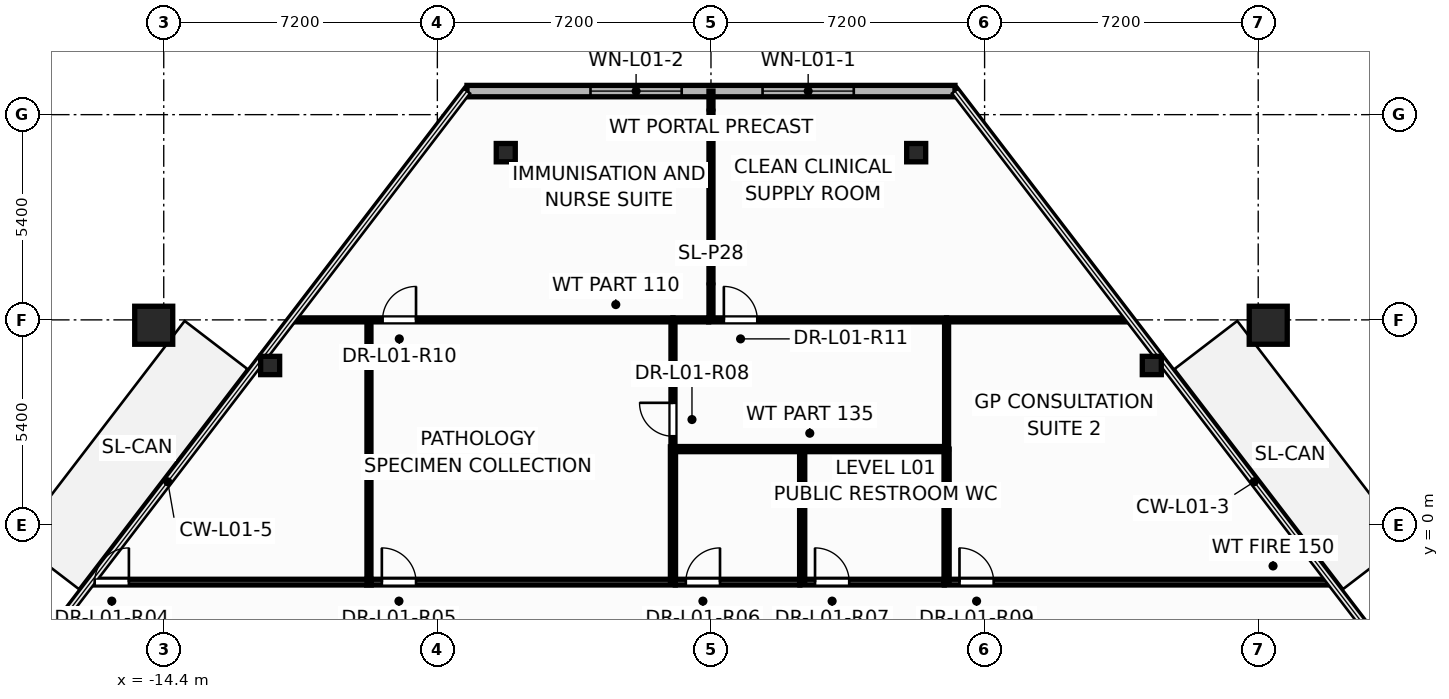
"""IFC4 building model, lengths in metres.
Left out: names, types, materials, properties, quantities, classifications, styles, units other than length and angle.
Written with IfcOpenShell. Run it as: python <this file> out.ifc"""

import sys

from ifc_helpers import new_model, si_unit, direction, frame, frame_2d, origin, origin_2d, place, context, subcontext, project, spatial, rectangle, hollow_circle, i_section, extrude, element, fill, save


model = new_model("IFC4")
c1 = context("Model", 3, precision=1e-05, world=origin(), true_north=direction((0.0, 1.0)))
c2 = subcontext(c1, "Body", "Model", "MODEL_VIEW")
j1 = project(units=[si_unit("LENGTHUNIT", "METRE"), si_unit("PLANEANGLEUNIT", "RADIAN")], contexts=[c1])
p1 = place(None, origin())
s1 = spatial("IfcSite", under=j1, at=p1, CompositionType="ELEMENT")
p2 = place(p1, origin())
s2 = spatial("IfcBuilding", under=s1, at=p2, CompositionType="ELEMENT")
p3 = place(p2, frame((0.0, 0.0, 5.4)))
s3 = spatial("IfcBuildingStorey", under=s2, at=p3, CompositionType="ELEMENT", Elevation=5.4)
for number, where, z_axis, x_axis in (
    (1, (14.664, 5.259, 0.0), (0.0, 0.0, 1.0), (1.0, 0.0, 0.0)),
    (2, (-14.664, 5.259, 0.0), (0.0, 0.0, 1.0), (1.0, 0.0, 0.0)),
):
    element("IfcColumn", number, at=place(p3, frame(where, z_axis=z_axis, x_axis=x_axis)), inside=s3, PredefinedType="COLUMN", context=c2, shape_type="SweptSolid", body=[
        extrude(hollow_circle(Radius=0.5, WallThickness=0.045, at=origin_2d()), origin(), (0.0, 0.0, 1.0), 4.5),
    ])
for number, where, z_axis, x_axis in (
    (3, (-11.6, 4.2, 0.0), (0.0, 0.0, 1.0), (1.0, 0.0, 0.0)),
    (4, (11.6, 4.2, 0.0), (0.0, 0.0, 1.0), (1.0, 0.0, 0.0)),
    (5, (-5.4, 9.8, 0.0), (0.0, 0.0, 1.0), (1.0, 0.0, 0.0)),
    (6, (5.4, 9.8, 0.0), (0.0, 0.0, 1.0), (1.0, 0.0, 0.0)),
):
    element("IfcColumn", number, at=place(p3, frame(where, z_axis=z_axis, x_axis=x_axis)), inside=s3, PredefinedType="COLUMN", context=c2, shape_type="SweptSolid", body=[
        extrude(i_section(OverallWidth=0.5, OverallDepth=0.482, WebThickness=0.04, FlangeThickness=0.045, at=origin_2d()), origin(), (0.0, 0.0, 1.0), 4.5),
    ])
p4 = place(p3, frame((6.421, 11.42, -0.015), z_axis=(0.0, 0.0, 1.0), x_axis=(-1.0, 0.0, 0.0)))
e7 = element("IfcWall", 7, at=p4, inside=s3, PredefinedType="SOLIDWALL", context=c2, shape_type="SweptSolid", body=[
    extrude(rectangle(XDim=12.842, YDim=0.3, at=frame_2d((6.421, 0.0))), origin(), (0.0, 0.0, 1.0), 4.235),
])
p5 = place(p4, frame((2.663, 0.0, 0.9)))
e8 = element("IfcOpeningElement", 8, at=p5, cuts=e7, PredefinedType="OPENING", context=c2, shape_type="SweptSolid", body=[
    extrude(rectangle(XDim=2.406, YDim=1.804, at=frame_2d((1.2, 0.902))), frame((0.0, 0.16, 0.0), z_axis=(0.0, -1.0, 0.0), x_axis=(1.0, 0.0, 0.0)), (0.0, 0.0, 1.0), 0.32),
])
p6 = place(p4, frame((7.191, 0.0, 0.9)))
e9 = element("IfcOpeningElement", 9, at=p6, cuts=e7, PredefinedType="OPENING", context=c2, shape_type="SweptSolid", body=[
    extrude(rectangle(XDim=2.406, YDim=1.804, at=frame_2d((1.2, 0.902))), frame((0.0, 0.16, 0.0), z_axis=(0.0, -1.0, 0.0), x_axis=(1.0, 0.0, 0.0)), (0.0, 0.0, 1.0), 0.32),
])
p7 = place(p3, frame((6.14, -1.5, 0.0), z_axis=(0.0, 0.0, 1.0), x_axis=(1.0, 0.0, 0.0)))
e10 = element("IfcWall", 10, at=p7, inside=s3, PredefinedType="PARTITIONING", context=c2, shape_type="SweptSolid", body=[
    extrude(rectangle(XDim=10.177, YDim=0.15, at=frame_2d((5.088, 0.0))), origin(), (0.0, 0.0, 1.0), 4.068),
])
p8 = place(p7, frame((0.399, 0.0, 0.0)))
e11 = element("IfcOpeningElement", 11, at=p8, cuts=e10, PredefinedType="OPENING", context=c2, shape_type="SweptSolid", body=[
    extrude(rectangle(XDim=0.906, YDim=2.104, at=frame_2d((0.45, 1.052))), frame((0.0, 0.085, 0.0), z_axis=(0.0, -1.0, 0.0), x_axis=(1.0, 0.0, 0.0)), (0.0, 0.0, 1.0), 0.17),
])
p9 = place(p3, frame((-11.032, 5.4, 0.0), z_axis=(0.0, 0.0, 1.0), x_axis=(1.0, 0.0, 0.0)))
e12 = element("IfcWall", 12, at=p9, inside=s3, PredefinedType="PARTITIONING", context=c2, shape_type="SweptSolid", body=[
    extrude(rectangle(XDim=10.032, YDim=0.105, at=frame_2d((5.016, 0.0))), origin(), (0.0, 0.0, 1.0), 3.195),
])
p10 = place(p9, frame((2.39, 0.0, 0.0)))
e13 = element("IfcOpeningElement", 13, at=p10, cuts=e12, PredefinedType="OPENING", context=c2, shape_type="SweptSolid", body=[
    extrude(rectangle(XDim=0.886, YDim=2.104, at=frame_2d((0.44, 1.052))), frame((0.0, 0.062, 0.0), z_axis=(0.0, -1.0, 0.0), x_axis=(1.0, 0.0, 0.0)), (0.0, 0.0, 1.0), 0.125),
])
p11 = place(p3, frame((-9.06, -1.5, 0.0), z_axis=(0.0, 0.0, 1.0), x_axis=(1.0, 0.0, 0.0)))
e14 = element("IfcWall", 14, at=p11, inside=s3, PredefinedType="PARTITIONING", context=c2, shape_type="SweptSolid", body=[
    extrude(rectangle(XDim=8.12, YDim=0.15, at=frame_2d((4.06, 0.0))), origin(), (0.0, 0.0, 1.0), 4.22),
])
p12 = place(p11, frame((0.399, 0.0, 0.0)))
e15 = element("IfcOpeningElement", 15, at=p12, cuts=e14, PredefinedType="OPENING", context=c2, shape_type="SweptSolid", body=[
    extrude(rectangle(XDim=0.906, YDim=2.104, at=frame_2d((0.45, 1.052))), frame((0.0, 0.085, 0.0), z_axis=(0.0, -1.0, 0.0), x_axis=(1.0, 0.0, 0.0)), (0.0, 0.0, 1.0), 0.17),
])
p13 = place(p3, frame((-16.317, -1.5, 0.0), z_axis=(0.0, 0.0, 1.0), x_axis=(1.0, 0.0, 0.0)))
e16 = element("IfcWall", 16, at=p13, inside=s3, PredefinedType="PARTITIONING", context=c2, shape_type="SweptSolid", body=[
    extrude(rectangle(XDim=7.377, YDim=0.15, at=frame_2d((3.688, 0.0))), origin(), (0.0, 0.0, 1.0), 4.068),
])
p14 = place(p13, frame((0.1, 0.0, 0.0)))
e17 = element("IfcOpeningElement", 17, at=p14, cuts=e16, PredefinedType="OPENING", context=c2, shape_type="SweptSolid", body=[
    extrude(rectangle(XDim=0.906, YDim=2.104, at=frame_2d((0.45, 1.052))), frame((0.0, 0.085, 0.0), z_axis=(0.0, -1.0, 0.0), x_axis=(1.0, 0.0, 0.0)), (0.0, 0.0, 1.0), 0.17),
])
p15 = place(p3, frame((-9.0, -1.5, 0.0), z_axis=(0.0, 0.0, 1.0), x_axis=(0.0, 1.0, 0.0)))
e18 = element("IfcWall", 18, at=p15, inside=s3, PredefinedType="PARTITIONING", context=c2, shape_type="SweptSolid", body=[
    extrude(rectangle(XDim=6.9, YDim=0.105, at=frame_2d((3.45, 0.0))), origin(), (0.0, 0.0, 1.0), 2.995),
])
p16 = place(p3, frame((-0.06, 5.4, 0.0), z_axis=(0.0, 0.0, 1.0), x_axis=(1.0, 0.0, 0.0)))
e19 = element("IfcWall", 19, at=p16, inside=s3, PredefinedType="PARTITIONING", context=c2, shape_type="SweptSolid", body=[
    extrude(rectangle(XDim=6.26, YDim=0.105, at=frame_2d((3.13, 0.0))), origin(), (0.0, 0.0, 1.0), 4.22),
])
p17 = place(p16, frame((0.399, 0.0, 0.0)))
e20 = element("IfcOpeningElement", 20, at=p17, cuts=e19, PredefinedType="OPENING", context=c2, shape_type="SweptSolid", body=[
    extrude(rectangle(XDim=0.886, YDim=2.104, at=frame_2d((0.44, 1.052))), frame((0.0, 0.062, 0.0), z_axis=(0.0, -1.0, 0.0), x_axis=(1.0, 0.0, 0.0)), (0.0, 0.0, 1.0), 0.125),
])
p18 = place(p3, frame((0.0, 5.4, 0.0), z_axis=(0.0, 0.0, 1.0), x_axis=(0.0, 1.0, 0.0)))
e21 = element("IfcWall", 21, at=p18, inside=s3, PredefinedType="PARTITIONING", context=c2, shape_type="SweptSolid", body=[
    extrude(rectangle(XDim=6.02, YDim=0.105, at=frame_2d((3.01, 0.0))), origin(), (0.0, 0.0, 1.0), 3.195),
])
p19 = place(p3, frame((6.2, 5.4, 0.0), z_axis=(0.0, 0.0, 1.0), x_axis=(1.0, 0.0, 0.0)))
e22 = element("IfcWall", 22, at=p19, inside=s3, PredefinedType="PARTITIONING", context=c2, shape_type="SweptSolid", body=[
    extrude(rectangle(XDim=4.832, YDim=0.105, at=frame_2d((2.416, 0.0))), origin(), (0.0, 0.0, 1.0), 3.195),
])
p20 = place(p3, frame((2.34, -1.5, 0.0), z_axis=(0.0, 0.0, 1.0), x_axis=(1.0, 0.0, 0.0)))
e23 = element("IfcWall", 23, at=p20, inside=s3, PredefinedType="PARTITIONING", context=c2, shape_type="SweptSolid", body=[
    extrude(rectangle(XDim=3.798, YDim=0.15, at=frame_2d((1.899, 0.0))), origin(), (0.0, 0.0, 1.0), 4.22),
])
p21 = place(p20, frame((0.398, 0.0, 0.0)))
e24 = element("IfcOpeningElement", 24, at=p21, cuts=e23, PredefinedType="OPENING", context=c2, shape_type="SweptSolid", body=[
    extrude(rectangle(XDim=0.906, YDim=2.104, at=frame_2d((0.45, 1.052))), frame((0.0, 0.085, 0.0), z_axis=(0.0, -1.0, 0.0), x_axis=(1.0, 0.0, 0.0)), (0.0, 0.0, 1.0), 0.17),
])
p22 = place(p3, frame((-1.0, 2.0, 0.0), z_axis=(0.0, 0.0, 1.0), x_axis=(1.0, 0.0, 0.0)))
e25 = element("IfcWall", 25, at=p22, inside=s3, PredefinedType="PARTITIONING", context=c2, shape_type="SweptSolid", body=[
    extrude(rectangle(XDim=7.2, YDim=0.135, at=frame_2d((3.6, 0.0))), origin(), (0.0, 0.0, 1.0), 4.22),
])
p23 = place(p3, frame((-1.0, -1.5, 0.0), z_axis=(0.0, 0.0, 1.0), x_axis=(0.0, 1.0, 0.0)))
e26 = element("IfcWall", 26, at=p23, inside=s3, PredefinedType="PARTITIONING", context=c2, shape_type="SweptSolid", body=[
    extrude(rectangle(XDim=3.56, YDim=0.135, at=frame_2d((1.78, 0.0))), origin(), (0.0, 0.0, 1.0), 4.22),
])
p24 = place(p3, frame((-0.938, -1.5, 0.0), z_axis=(0.0, 0.0, 1.0), x_axis=(1.0, 0.0, 0.0)))
e27 = element("IfcWall", 27, at=p24, inside=s3, PredefinedType="PARTITIONING", context=c2, shape_type="SweptSolid", body=[
    extrude(rectangle(XDim=3.276, YDim=0.15, at=frame_2d((1.638, 0.0))), origin(), (0.0, 0.0, 1.0), 4.22),
])
p25 = place(p24, frame((0.276, 0.0, 0.0)))
e28 = element("IfcOpeningElement", 28, at=p25, cuts=e27, PredefinedType="OPENING", context=c2, shape_type="SweptSolid", body=[
    extrude(rectangle(XDim=0.906, YDim=2.104, at=frame_2d((0.45, 1.052))), frame((0.0, 0.085, 0.0), z_axis=(0.0, -1.0, 0.0), x_axis=(1.0, 0.0, 0.0)), (0.0, 0.0, 1.0), 0.17),
])
for number, where, z_axis, x_axis in (
    (29, (2.4, -1.5, 0.0), (0.0, 0.0, 1.0), (0.0, 1.0, 0.0)),
    (30, (6.2, -1.5, 0.0), (0.0, 0.0, 1.0), (0.0, 1.0, 0.0)),
):
    element("IfcWall", number, at=place(p3, frame(where, z_axis=z_axis, x_axis=x_axis)), inside=s3, PredefinedType="PARTITIONING", context=c2, shape_type="SweptSolid", body=[
        extrude(rectangle(XDim=3.5, YDim=0.135, at=frame_2d((1.75, 0.0))), origin(), (0.0, 0.0, 1.0), 4.22),
    ])
p26 = place(p3, frame((-1.0, 2.062, 0.0), z_axis=(0.0, 0.0, 1.0), x_axis=(0.0, 1.0, 0.0)))
e31 = element("IfcWall", 31, at=p26, inside=s3, PredefinedType="PARTITIONING", context=c2, shape_type="SweptSolid", body=[
    extrude(rectangle(XDim=3.338, YDim=0.105, at=frame_2d((1.669, 0.0))), origin(), (0.0, 0.0, 1.0), 2.995),
])
p27 = place(p26, frame((0.276, 0.0, 0.0)))
e32 = element("IfcOpeningElement", 32, at=p27, cuts=e31, PredefinedType="OPENING", context=c2, shape_type="SweptSolid", body=[
    extrude(rectangle(XDim=0.886, YDim=2.104, at=frame_2d((0.44, 1.052))), frame((0.0, 0.062, 0.0), z_axis=(0.0, -1.0, 0.0), x_axis=(1.0, 0.0, 0.0)), (0.0, 0.0, 1.0), 0.125),
])
p28 = place(p3, frame((6.2, 2.0, 0.0), z_axis=(0.0, 0.0, 1.0), x_axis=(0.0, 1.0, 0.0)))
e33 = element("IfcWall", 33, at=p28, inside=s3, PredefinedType="PARTITIONING", context=c2, shape_type="SweptSolid", body=[
    extrude(rectangle(XDim=3.4, YDim=0.105, at=frame_2d((1.7, 0.0))), origin(), (0.0, 0.0, 1.0), 2.995),
])
p29 = place(p3, frame((-1.0, 5.4, 0.0), z_axis=(0.0, 0.0, 1.0), x_axis=(1.0, 0.0, 0.0)))
e34 = element("IfcWall", 34, at=p29, inside=s3, PredefinedType="PARTITIONING", context=c2, shape_type="SweptSolid", body=[
    extrude(rectangle(XDim=0.938, YDim=0.105, at=frame_2d((0.469, 0.0))), origin(), (0.0, 0.0, 1.0), 4.22),
])
p30 = place(p5, origin())
e35 = element("IfcWindow", 35, at=p30, inside=s3, PartitioningType="SINGLE_PANEL", PredefinedType="WINDOW", context=c2, shape_type="SweptSolid", body=[
    extrude(rectangle(XDim=2.4, YDim=1.8, at=frame_2d((1.2, 0.9))), frame((0.0, 0.03, 0.0), z_axis=(0.0, -1.0, 0.0), x_axis=(1.0, 0.0, 0.0)), (0.0, 0.0, 1.0), 0.06),
])
fill(e8, e35)
p31 = place(p6, origin())
e36 = element("IfcWindow", 36, at=p31, inside=s3, PartitioningType="SINGLE_PANEL", PredefinedType="WINDOW", context=c2, shape_type="SweptSolid", body=[
    extrude(rectangle(XDim=2.4, YDim=1.8, at=frame_2d((1.2, 0.9))), frame((0.0, 0.03, 0.0), z_axis=(0.0, -1.0, 0.0), x_axis=(1.0, 0.0, 0.0)), (0.0, 0.0, 1.0), 0.06),
])
fill(e9, e36)
p32 = place(p14, origin())
e37 = element("IfcDoor", 37, at=p32, inside=s3, OperationType="SINGLE_SWING_RIGHT", PredefinedType="DOOR", context=c2, shape_type="SweptSolid", body=[
    extrude(rectangle(XDim=0.9, YDim=2.1, at=frame_2d((0.45, 1.05))), frame((0.0, 0.025, 0.0), z_axis=(0.0, -1.0, 0.0), x_axis=(1.0, 0.0, 0.0)), (0.0, 0.0, 1.0), 0.05),
])
fill(e17, e37)
p33 = place(p12, origin())
e38 = element("IfcDoor", 38, at=p33, inside=s3, OperationType="SINGLE_SWING_LEFT", PredefinedType="DOOR", context=c2, shape_type="SweptSolid", body=[
    extrude(rectangle(XDim=0.9, YDim=2.1, at=frame_2d((0.45, 1.05))), frame((0.0, 0.025, 0.0), z_axis=(0.0, -1.0, 0.0), x_axis=(1.0, 0.0, 0.0)), (0.0, 0.0, 1.0), 0.05),
])
fill(e15, e38)
p34 = place(p25, origin())
e39 = element("IfcDoor", 39, at=p34, inside=s3, OperationType="SINGLE_SWING_RIGHT", PredefinedType="DOOR", context=c2, shape_type="SweptSolid", body=[
    extrude(rectangle(XDim=0.9, YDim=2.1, at=frame_2d((0.45, 1.05))), frame((0.0, 0.025, 0.0), z_axis=(0.0, -1.0, 0.0), x_axis=(1.0, 0.0, 0.0)), (0.0, 0.0, 1.0), 0.05),
])
fill(e28, e39)
p35 = place(p21, origin())
e40 = element("IfcDoor", 40, at=p35, inside=s3, OperationType="SINGLE_SWING_LEFT", PredefinedType="DOOR", context=c2, shape_type="SweptSolid", body=[
    extrude(rectangle(XDim=0.9, YDim=2.1, at=frame_2d((0.45, 1.05))), frame((0.0, 0.025, 0.0), z_axis=(0.0, -1.0, 0.0), x_axis=(1.0, 0.0, 0.0)), (0.0, 0.0, 1.0), 0.05),
])
fill(e24, e40)
p36 = place(p27, origin())
e41 = element("IfcDoor", 41, at=p36, inside=s3, OperationType="SINGLE_SWING_RIGHT", PredefinedType="DOOR", context=c2, shape_type="SweptSolid", body=[
    extrude(rectangle(XDim=0.88, YDim=2.1, at=frame_2d((0.44, 1.05))), frame((0.0, 0.025, 0.0), z_axis=(0.0, -1.0, 0.0), x_axis=(1.0, 0.0, 0.0)), (0.0, 0.0, 1.0), 0.05),
])
fill(e32, e41)
p37 = place(p8, origin())
e42 = element("IfcDoor", 42, at=p37, inside=s3, OperationType="SINGLE_SWING_LEFT", PredefinedType="DOOR", context=c2, shape_type="SweptSolid", body=[
    extrude(rectangle(XDim=0.9, YDim=2.1, at=frame_2d((0.45, 1.05))), frame((0.0, 0.025, 0.0), z_axis=(0.0, -1.0, 0.0), x_axis=(1.0, 0.0, 0.0)), (0.0, 0.0, 1.0), 0.05),
])
fill(e11, e42)
p38 = place(p10, origin())
e43 = element("IfcDoor", 43, at=p38, inside=s3, OperationType="SINGLE_SWING_RIGHT", PredefinedType="DOOR", context=c2, shape_type="SweptSolid", body=[
    extrude(rectangle(XDim=0.88, YDim=2.1, at=frame_2d((0.44, 1.05))), frame((0.0, 0.025, 0.0), z_axis=(0.0, -1.0, 0.0), x_axis=(1.0, 0.0, 0.0)), (0.0, 0.0, 1.0), 0.05),
])
fill(e13, e43)
p39 = place(p17, origin())
e44 = element("IfcDoor", 44, at=p39, inside=s3, OperationType="SINGLE_SWING_LEFT", PredefinedType="DOOR", context=c2, shape_type="SweptSolid", body=[
    extrude(rectangle(XDim=0.88, YDim=2.1, at=frame_2d((0.44, 1.05))), frame((0.0, 0.025, 0.0), z_axis=(0.0, -1.0, 0.0), x_axis=(1.0, 0.0, 0.0)), (0.0, 0.0, 1.0), 0.05),
])
fill(e20, e44)
save(model, sys.argv[1])
